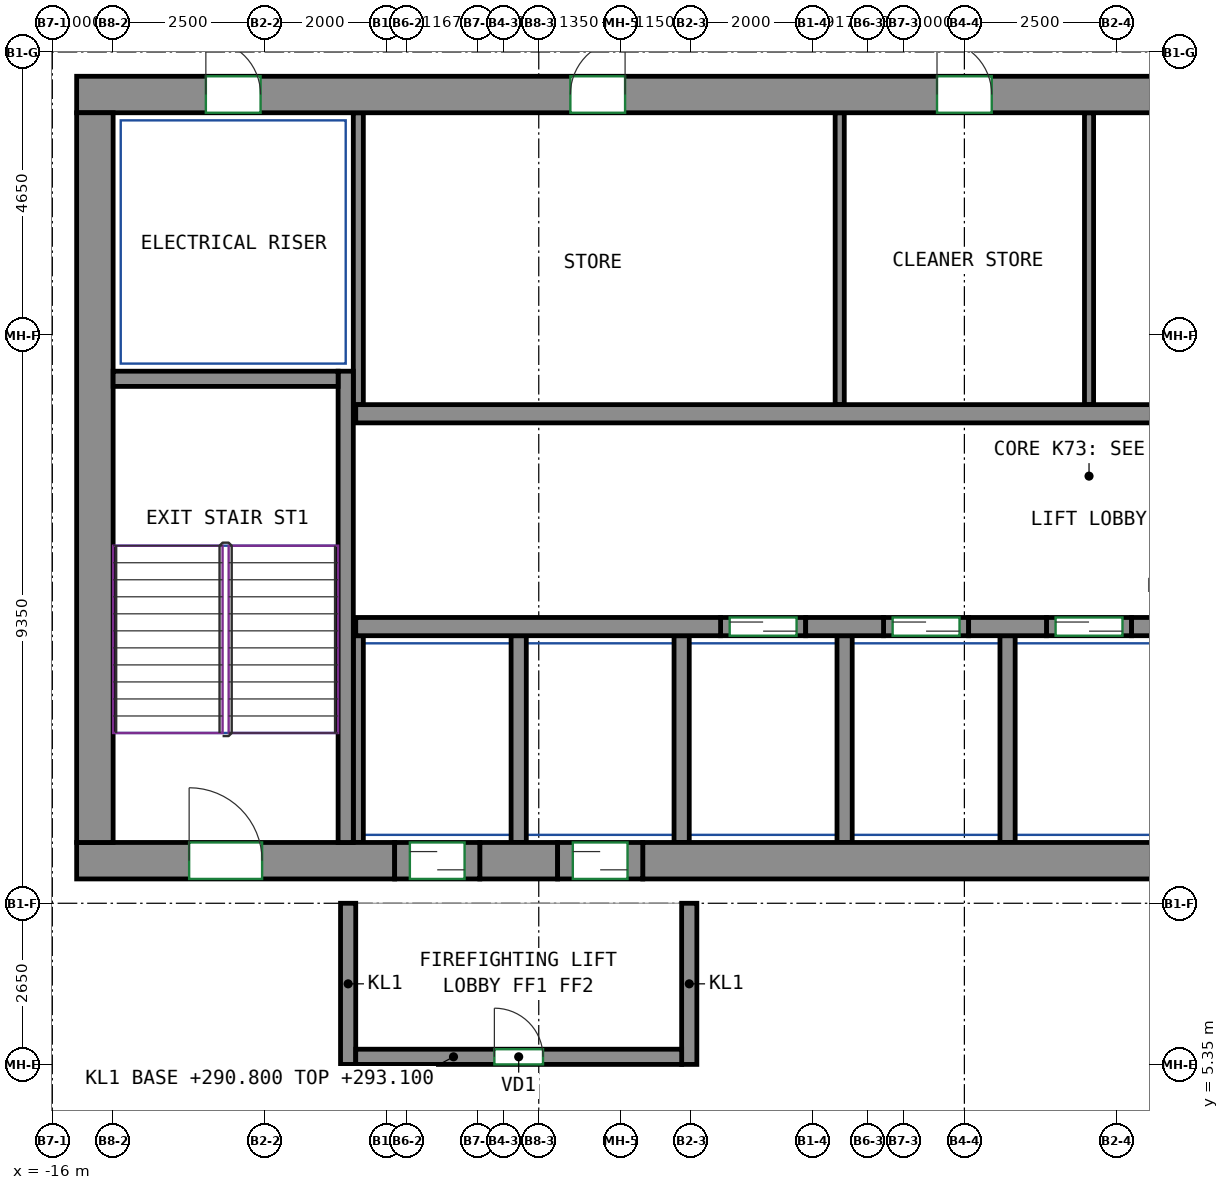
"""IFC4 building model, lengths in metres.
Left out: names, types, materials, properties, quantities, classifications, styles, units other than length and angle.
Written with IfcOpenShell. Run it as: python <this file> out.ifc"""

import sys

from ifc_helpers import new_model, si_unit, direction, frame, frame_2d, origin, place, context, subcontext, project, spatial, rectangle, extrude, source, transform, mapped, element, fill, save


model = new_model("IFC4")
c1 = context("Model", 3, precision=1e-05, world=origin(), true_north=direction((0.0, 1.0)))
c2 = subcontext(c1, "Body", "Model", "MODEL_VIEW")
j1 = project(units=[si_unit("LENGTHUNIT", "METRE"), si_unit("PLANEANGLEUNIT", "RADIAN")], contexts=[c1])
p1 = place(None, origin())
s1 = spatial("IfcSite", under=j1, at=p1, CompositionType="ELEMENT")
p2 = place(p1, origin())
s2 = spatial("IfcBuilding", under=s1, at=p2, CompositionType="ELEMENT")
p3 = place(p2, frame((0.0, 0.0, 290.8)))
s3 = spatial("IfcBuildingStorey", under=s2, at=p3, CompositionType="ELEMENT", Elevation=290.8)
m1 = source(origin(), c2, "Body", "SweptSolid", [
    extrude(rectangle(XDim=5.23, YDim=0.6, at=frame_2d((2.615, 0.0))), origin(), (0.0, 0.0, 1.0), 3.8),
])
p4 = place(p3, frame((-15.6, 8.7, 0.0), z_axis=(0.0, 0.0, 1.0), x_axis=(1.0, 0.0, 0.0)))
e1 = element("IfcWall", 1, at=p4, inside=s3, PredefinedType="SHEAR", context=c2, shape_type="MappedRepresentation", body=[
    mapped(m1, transform((0.0, 0.0, 0.0))),
])
p5 = place(p4, frame((1.85, 0.0, 0.0)))
e2 = element("IfcOpeningElement", 2, at=p5, cuts=e1, PredefinedType="OPENING", context=c2, shape_type="SweptSolid", body=[
    extrude(rectangle(XDim=1.2, YDim=2.1, at=frame_2d((0.6, 1.05))), frame((0.0, 0.31, 0.0), z_axis=(0.0, -1.0, 0.0), x_axis=(1.0, 0.0, 0.0)), (0.0, 0.0, 1.0), 0.62),
])
m2 = source(origin(), c2, "Body", "SweptSolid", [
    extrude(rectangle(XDim=1.28, YDim=0.6, at=frame_2d((0.64, 0.0))), origin(), (0.0, 0.0, 1.0), 3.8),
])
p6 = place(p3, frame((-8.97, 8.7, 0.0), z_axis=(0.0, 0.0, 1.0), x_axis=(1.0, 0.0, 0.0)))
e3 = element("IfcWall", 3, at=p6, inside=s3, PredefinedType="SHEAR", context=c2, shape_type="MappedRepresentation", body=[
    mapped(m2, transform((0.0, 0.0, 0.0))),
])
m3 = source(origin(), c2, "Body", "SweptSolid", [
    extrude(rectangle(XDim=14.18, YDim=0.6, at=frame_2d((7.09, 0.0))), origin(), (0.0, 0.0, 1.0), 3.8),
])
p7 = place(p3, frame((-6.29, 8.7, 0.0), z_axis=(0.0, 0.0, 1.0), x_axis=(1.0, 0.0, 0.0)))
e4 = element("IfcWall", 4, at=p7, inside=s3, PredefinedType="SHEAR", context=c2, shape_type="MappedRepresentation", body=[
    mapped(m3, transform((0.0, 0.0, 0.0))),
])
m4 = source(origin(), c2, "Body", "SweptSolid", [
    extrude(rectangle(XDim=33.3, YDim=0.6, at=frame_2d((16.65, 0.0))), origin(), (0.0, 0.0, 1.0), 3.8),
])
p8 = place(p3, frame((-15.6, 21.3, 0.0), z_axis=(0.0, 0.0, 1.0), x_axis=(1.0, 0.0, 0.0)))
e5 = element("IfcWall", 5, at=p8, inside=s3, PredefinedType="SHEAR", context=c2, shape_type="MappedRepresentation", body=[
    mapped(m4, transform((0.0, 0.0, 0.0))),
])
p9 = place(p8, frame((8.12, 0.0, 0.0)))
e6 = element("IfcOpeningElement", 6, at=p9, cuts=e5, PredefinedType="OPENING", context=c2, shape_type="SweptSolid", body=[
    extrude(rectangle(XDim=0.9, YDim=2.1, at=frame_2d((0.45, 1.05))), frame((0.0, 0.31, 0.0), z_axis=(0.0, -1.0, 0.0), x_axis=(1.0, 0.0, 0.0)), (0.0, 0.0, 1.0), 0.62),
])
p10 = place(p8, frame((14.15, 0.0, 0.0)))
e7 = element("IfcOpeningElement", 7, at=p10, cuts=e5, PredefinedType="OPENING", context=c2, shape_type="SweptSolid", body=[
    extrude(rectangle(XDim=0.9, YDim=2.1, at=frame_2d((0.45, 1.05))), frame((0.0, 0.31, 0.0), z_axis=(0.0, -1.0, 0.0), x_axis=(1.0, 0.0, 0.0)), (0.0, 0.0, 1.0), 0.62),
])
p11 = place(p8, frame((18.974, 0.0, 0.0)))
e8 = element("IfcOpeningElement", 8, at=p11, cuts=e5, PredefinedType="OPENING", context=c2, shape_type="SweptSolid", body=[
    extrude(rectangle(XDim=0.9, YDim=2.1, at=frame_2d((0.45, 1.05))), frame((0.0, 0.31, 0.0), z_axis=(0.0, -1.0, 0.0), x_axis=(1.0, 0.0, 0.0)), (0.0, 0.0, 1.0), 0.62),
])
p12 = place(p8, frame((23.664, 0.0, 0.0)))
e9 = element("IfcOpeningElement", 9, at=p12, cuts=e5, PredefinedType="OPENING", context=c2, shape_type="SweptSolid", body=[
    extrude(rectangle(XDim=0.9, YDim=2.1, at=frame_2d((0.45, 1.05))), frame((0.0, 0.31, 0.0), z_axis=(0.0, -1.0, 0.0), x_axis=(1.0, 0.0, 0.0)), (0.0, 0.0, 1.0), 0.62),
])
p13 = place(p8, frame((26.92, 0.0, 0.0)))
e10 = element("IfcOpeningElement", 10, at=p13, cuts=e5, PredefinedType="OPENING", context=c2, shape_type="SweptSolid", body=[
    extrude(rectangle(XDim=0.9, YDim=2.1, at=frame_2d((0.45, 1.05))), frame((0.0, 0.31, 0.0), z_axis=(0.0, -1.0, 0.0), x_axis=(1.0, 0.0, 0.0)), (0.0, 0.0, 1.0), 0.62),
])
p14 = place(p8, frame((2.125, 0.0, 0.0)))
e11 = element("IfcOpeningElement", 11, at=p14, cuts=e5, PredefinedType="OPENING", context=c2, shape_type="SweptSolid", body=[
    extrude(rectangle(XDim=0.9, YDim=2.1, at=frame_2d((0.45, 1.05))), frame((0.0, 0.31, 0.0), z_axis=(0.0, -1.0, 0.0), x_axis=(1.0, 0.0, 0.0)), (0.0, 0.0, 1.0), 0.62),
])
p15 = place(p8, frame((30.275, 0.0, 0.0)))
e12 = element("IfcOpeningElement", 12, at=p15, cuts=e5, PredefinedType="OPENING", context=c2, shape_type="SweptSolid", body=[
    extrude(rectangle(XDim=0.9, YDim=2.1, at=frame_2d((0.45, 1.05))), frame((0.0, 0.31, 0.0), z_axis=(0.0, -1.0, 0.0), x_axis=(1.0, 0.0, 0.0)), (0.0, 0.0, 1.0), 0.62),
])
m5 = source(origin(), c2, "Body", "SweptSolid", [
    extrude(rectangle(XDim=12.0, YDim=0.6, at=frame_2d((6.0, 0.0))), origin(), (0.0, 0.0, 1.0), 3.8),
])
p16 = place(p3, frame((-15.3, 9.0, 0.0), z_axis=(0.0, 0.0, 1.0), x_axis=(0.0, 1.0, 0.0)))
e13 = element("IfcWall", 13, at=p16, inside=s3, PredefinedType="SHEAR", context=c2, shape_type="MappedRepresentation", body=[
    mapped(m5, transform((0.0, 0.0, 0.0))),
])
m6 = source(origin(), c2, "Body", "SweptSolid", [
    extrude(rectangle(XDim=7.75, YDim=0.25, at=frame_2d((3.875, 0.0))), origin(), (0.0, 0.0, 1.0), 3.8),
])
p17 = place(p3, frame((-11.175, 9.0, 0.0), z_axis=(0.0, 0.0, 1.0), x_axis=(0.0, 1.0, 0.0)))
e14 = element("IfcWall", 14, at=p17, inside=s3, PredefinedType="SHEAR", context=c2, shape_type="MappedRepresentation", body=[
    mapped(m6, transform((0.0, 0.0, 0.0))),
])
m7 = source(origin(), c2, "Body", "SweptSolid", [
    extrude(rectangle(XDim=3.7, YDim=0.25, at=frame_2d((1.85, 0.0))), origin(), (0.0, 0.0, 1.0), 3.8),
])
p18 = place(p3, frame((-15.0, 16.625, 0.0), z_axis=(0.0, 0.0, 1.0), x_axis=(1.0, 0.0, 0.0)))
e15 = element("IfcWall", 15, at=p18, inside=s3, PredefinedType="SHEAR", context=c2, shape_type="MappedRepresentation", body=[
    mapped(m7, transform((0.0, 0.0, 0.0))),
])
m8 = source(origin(), c2, "Body", "SweptSolid", [
    extrude(rectangle(XDim=6.0, YDim=0.3, at=frame_2d((3.0, 0.0))), origin(), (0.0, 0.0, 1.0), 3.8),
])
p19 = place(p3, frame((-11.01, 12.55, 0.0), z_axis=(0.0, 0.0, 1.0), x_axis=(1.0, 0.0, 0.0)))
e16 = element("IfcWall", 16, at=p19, inside=s3, PredefinedType="SHEAR", context=c2, shape_type="MappedRepresentation", body=[
    mapped(m8, transform((0.0, 0.0, 0.0))),
])
m9 = source(origin(), c2, "Body", "SweptSolid", [
    extrude(rectangle(XDim=1.28, YDim=0.3, at=frame_2d((0.64, 0.0))), origin(), (0.0, 0.0, 1.0), 3.8),
])
for number, where, z_axis, x_axis in (
    (17, (-3.61, 12.55, 0.0), (0.0, 0.0, 1.0), (1.0, 0.0, 0.0)),
    (18, (-0.93, 12.55, 0.0), (0.0, 0.0, 1.0), (1.0, 0.0, 0.0)),
    (19, (1.75, 12.55, 0.0), (0.0, 0.0, 1.0), (1.0, 0.0, 0.0)),
):
    element("IfcWall", number, at=place(p3, frame(where, z_axis=z_axis, x_axis=x_axis)), inside=s3, PredefinedType="SHEAR", context=c2, shape_type="MappedRepresentation", body=[
        mapped(m9, transform((0.0, 0.0, 0.0))),
    ])
m10 = source(origin(), c2, "Body", "SweptSolid", [
    extrude(rectangle(XDim=22.08, YDim=0.3, at=frame_2d((11.04, 0.0))), origin(), (0.0, 0.0, 1.0), 3.8),
])
p20 = place(p3, frame((-11.01, 16.05, 0.0), z_axis=(0.0, 0.0, 1.0), x_axis=(1.0, 0.0, 0.0)))
e20 = element("IfcWall", 20, at=p20, inside=s3, PredefinedType="SHEAR", context=c2, shape_type="MappedRepresentation", body=[
    mapped(m10, transform((0.0, 0.0, 0.0))),
])
m11 = source(origin(), c2, "Body", "SweptSolid", [
    extrude(rectangle(XDim=1.4, YDim=0.3, at=frame_2d((0.7, 0.0))), origin(), (0.0, 0.0, 1.0), 3.8),
])
p21 = place(p3, frame((-5.01, 12.55, 0.0), z_axis=(0.0, 0.0, 1.0), x_axis=(1.0, 0.0, 0.0)))
e21 = element("IfcWall", 21, at=p21, inside=s3, PredefinedType="PARTITIONING", context=c2, shape_type="MappedRepresentation", body=[
    mapped(m11, transform((0.0, 0.0, 0.0))),
])
p22 = place(p21, frame((0.15, 0.0, 0.0)))
e22 = element("IfcOpeningElement", 22, at=p22, cuts=e21, PredefinedType="OPENING", context=c2, shape_type="SweptSolid", body=[
    extrude(rectangle(XDim=1.1, YDim=2.1, at=frame_2d((0.55, 1.05))), frame((0.0, 0.16, 0.0), z_axis=(0.0, -1.0, 0.0), x_axis=(1.0, 0.0, 0.0)), (0.0, 0.0, 1.0), 0.32),
])
m12 = source(origin(), c2, "Body", "SweptSolid", [
    extrude(rectangle(XDim=1.4, YDim=0.3, at=frame_2d((0.7, 0.0))), origin(), (0.0, 0.0, 1.0), 3.8),
])
p23 = place(p3, frame((-2.33, 12.55, 0.0), z_axis=(0.0, 0.0, 1.0), x_axis=(1.0, 0.0, 0.0)))
e23 = element("IfcWall", 23, at=p23, inside=s3, PredefinedType="PARTITIONING", context=c2, shape_type="MappedRepresentation", body=[
    mapped(m12, transform((0.0, 0.0, 0.0))),
])
p24 = place(p23, frame((0.15, 0.0, 0.0)))
e24 = element("IfcOpeningElement", 24, at=p24, cuts=e23, PredefinedType="OPENING", context=c2, shape_type="SweptSolid", body=[
    extrude(rectangle(XDim=1.1, YDim=2.1, at=frame_2d((0.55, 1.05))), frame((0.0, 0.16, 0.0), z_axis=(0.0, -1.0, 0.0), x_axis=(1.0, 0.0, 0.0)), (0.0, 0.0, 1.0), 0.32),
])
p25 = place(p3, frame((0.35, 12.55, 0.0), z_axis=(0.0, 0.0, 1.0), x_axis=(1.0, 0.0, 0.0)))
e25 = element("IfcWall", 25, at=p25, inside=s3, PredefinedType="PARTITIONING", context=c2, shape_type="MappedRepresentation", body=[
    mapped(m11, transform((0.0, 0.0, 0.0))),
])
p26 = place(p25, frame((0.15, 0.0, 0.0)))
e26 = element("IfcOpeningElement", 26, at=p26, cuts=e25, PredefinedType="OPENING", context=c2, shape_type="SweptSolid", body=[
    extrude(rectangle(XDim=1.1, YDim=2.1, at=frame_2d((0.55, 1.05))), frame((0.0, 0.16, 0.0), z_axis=(0.0, -1.0, 0.0), x_axis=(1.0, 0.0, 0.0)), (0.0, 0.0, 1.0), 0.32),
])
m13 = source(origin(), c2, "Body", "SweptSolid", [
    extrude(rectangle(XDim=2.65, YDim=0.25, at=frame_2d((1.325, 0.0))), origin(), (0.0, 0.0, 1.0), 3.25),
])
for number, where, z_axis, x_axis in (
    (27, (-11.135, 5.35, 0.0), (0.0, 0.0, 1.0), (0.0, 1.0, 0.0)),
    (28, (-5.525, 5.35, 0.0), (0.0, 0.0, 1.0), (0.0, 1.0, 0.0)),
):
    element("IfcWall", number, at=place(p3, frame(where, z_axis=z_axis, x_axis=x_axis)), inside=s3, PredefinedType="PARTITIONING", context=c2, shape_type="MappedRepresentation", body=[
        mapped(m13, transform((0.0, 0.0, 0.0))),
    ])
m14 = source(origin(), c2, "Body", "SweptSolid", [
    extrude(rectangle(XDim=5.36, YDim=0.25, at=frame_2d((2.68, 0.0))), origin(), (0.0, 0.0, 1.0), 2.3),
])
p27 = place(p3, frame((-11.01, 5.475, 0.0), z_axis=(0.0, 0.0, 1.0), x_axis=(1.0, 0.0, 0.0)))
e29 = element("IfcWall", 29, at=p27, inside=s3, PredefinedType="PARTITIONING", context=c2, shape_type="MappedRepresentation", body=[
    mapped(m14, transform((0.0, 0.0, 0.0))),
])
p28 = place(p27, frame((2.28, 0.0, 0.0)))
e30 = element("IfcOpeningElement", 30, at=p28, cuts=e29, PredefinedType="OPENING", context=c2, shape_type="SweptSolid", body=[
    extrude(rectangle(XDim=0.8, YDim=2.0, at=frame_2d((0.4, 1.0))), frame((0.0, 0.135, 0.0), z_axis=(0.0, -1.0, 0.0), x_axis=(1.0, 0.0, 0.0)), (0.0, 0.0, 1.0), 0.27),
])
m15 = source(origin(), c2, "Body", "SweptSolid", [
    extrude(rectangle(XDim=4.8, YDim=0.165, at=frame_2d((2.4, 0.0))), origin(), (0.0, 0.0, 1.0), 3.8),
])
p29 = place(p3, frame((-10.968, 16.2, 0.0), z_axis=(0.0, 0.0, 1.0), x_axis=(0.0, 1.0, 0.0)))
e31 = element("IfcWall", 31, at=p29, inside=s3, PredefinedType="PARTITIONING", context=c2, shape_type="MappedRepresentation", body=[
    mapped(m15, transform((0.0, 0.0, 0.0))),
])
m16 = source(origin(), c2, "Body", "SweptSolid", [
    extrude(rectangle(XDim=3.4, YDim=0.25, at=frame_2d((1.7, 0.0))), origin(), (0.0, 0.0, 1.0), 3.8),
])
p30 = place(p3, frame((-0.29, 9.0, 0.0), z_axis=(0.0, 0.0, 1.0), x_axis=(0.0, 1.0, 0.0)))
e32 = element("IfcWall", 32, at=p30, inside=s3, PredefinedType="PARTITIONING", context=c2, shape_type="MappedRepresentation", body=[
    mapped(m16, transform((0.0, 0.0, 0.0))),
])
m17 = source(origin(), c2, "Body", "SweptSolid", [
    extrude(rectangle(XDim=3.4, YDim=0.165, at=frame_2d((1.7, 0.0))), origin(), (0.0, 0.0, 1.0), 3.8),
])
p31 = place(p3, frame((-10.968, 9.0, 0.0), z_axis=(0.0, 0.0, 1.0), x_axis=(0.0, 1.0, 0.0)))
e33 = element("IfcWall", 33, at=p31, inside=s3, PredefinedType="PARTITIONING", context=c2, shape_type="MappedRepresentation", body=[
    mapped(m17, transform((0.0, 0.0, 0.0))),
])
for number, where, z_axis, x_axis in (
    (34, (-2.97, 9.0, 0.0), (0.0, 0.0, 1.0), (0.0, 1.0, 0.0)),
    (35, (-5.65, 9.0, 0.0), (0.0, 0.0, 1.0), (0.0, 1.0, 0.0)),
    (36, (-8.33, 9.0, 0.0), (0.0, 0.0, 1.0), (0.0, 1.0, 0.0)),
):
    element("IfcWall", number, at=place(p3, frame(where, z_axis=z_axis, x_axis=x_axis)), inside=s3, PredefinedType="PARTITIONING", context=c2, shape_type="MappedRepresentation", body=[
        mapped(m16, transform((0.0, 0.0, 0.0))),
    ])
m18 = source(origin(), c2, "Body", "SweptSolid", [
    extrude(rectangle(XDim=4.8, YDim=0.15, at=frame_2d((2.4, 0.0))), origin(), (0.0, 0.0, 1.0), 3.8),
])
for number, where, z_axis, x_axis in (
    (37, (-3.05, 16.2, 0.0), (0.0, 0.0, 1.0), (0.0, 1.0, 0.0)),
    (38, (1.05, 16.2, 0.0), (0.0, 0.0, 1.0), (0.0, 1.0, 0.0)),
):
    element("IfcWall", number, at=place(p3, frame(where, z_axis=z_axis, x_axis=x_axis)), inside=s3, PredefinedType="PARTITIONING", context=c2, shape_type="MappedRepresentation", body=[
        mapped(m18, transform((0.0, 0.0, 0.0))),
    ])
m19 = source(origin(), c2, "Body", "SweptSolid", [
    extrude(rectangle(XDim=1.4, YDim=0.6, at=frame_2d((0.7, 0.0))), origin(), (0.0, 0.0, 1.0), 2.7),
])
p32 = place(p3, frame((-10.37, 8.7, 0.0), z_axis=(0.0, 0.0, 1.0), x_axis=(1.0, 0.0, 0.0)))
e39 = element("IfcWall", 39, at=p32, inside=s3, PredefinedType="PARTITIONING", context=c2, shape_type="MappedRepresentation", body=[
    mapped(m19, transform((0.0, 0.0, 0.0))),
])
p33 = place(p32, frame((0.25, 0.0, 0.0)))
e40 = element("IfcOpeningElement", 40, at=p33, cuts=e39, PredefinedType="OPENING", context=c2, shape_type="SweptSolid", body=[
    extrude(rectangle(XDim=0.9, YDim=2.1, at=frame_2d((0.45, 1.05))), frame((0.0, 0.31, 0.0), z_axis=(0.0, -1.0, 0.0), x_axis=(1.0, 0.0, 0.0)), (0.0, 0.0, 1.0), 0.62),
])
m20 = source(origin(), c2, "Body", "SweptSolid", [
    extrude(rectangle(XDim=1.4, YDim=0.6, at=frame_2d((0.7, 0.0))), origin(), (0.0, 0.0, 1.0), 2.7),
])
p34 = place(p3, frame((-7.69, 8.7, 0.0), z_axis=(0.0, 0.0, 1.0), x_axis=(1.0, 0.0, 0.0)))
e41 = element("IfcWall", 41, at=p34, inside=s3, PredefinedType="PARTITIONING", context=c2, shape_type="MappedRepresentation", body=[
    mapped(m20, transform((0.0, 0.0, 0.0))),
])
p35 = place(p34, frame((0.25, 0.0, 0.0)))
e42 = element("IfcOpeningElement", 42, at=p35, cuts=e41, PredefinedType="OPENING", context=c2, shape_type="SweptSolid", body=[
    extrude(rectangle(XDim=0.9, YDim=2.1, at=frame_2d((0.45, 1.05))), frame((0.0, 0.31, 0.0), z_axis=(0.0, -1.0, 0.0), x_axis=(1.0, 0.0, 0.0)), (0.0, 0.0, 1.0), 0.62),
])
p36 = place(p28, origin())
e43 = element("IfcDoor", 43, at=p36, inside=s3, OperationType="SINGLE_SWING_LEFT", PredefinedType="DOOR", context=c2, shape_type="SweptSolid", body=[
    extrude(rectangle(XDim=0.8, YDim=2.0, at=frame_2d((0.4, 1.0))), frame((0.0, 0.025, 0.0), z_axis=(0.0, -1.0, 0.0), x_axis=(1.0, 0.0, 0.0)), (0.0, 0.0, 1.0), 0.05),
])
fill(e30, e43)
p37 = place(p33, origin())
e44 = element("IfcDoor", 44, at=p37, inside=s3, OperationType="SLIDING_TO_LEFT", PredefinedType="DOOR", context=c2, shape_type="SweptSolid", body=[
    extrude(rectangle(XDim=0.9, YDim=2.1, at=frame_2d((0.45, 1.05))), frame((0.0, 0.205, 0.0), z_axis=(0.0, -1.0, 0.0), x_axis=(1.0, 0.0, 0.0)), (0.0, 0.0, 1.0), 0.05),
])
fill(e40, e44)
p38 = place(p35, origin())
e45 = element("IfcDoor", 45, at=p38, inside=s3, OperationType="SLIDING_TO_RIGHT", PredefinedType="DOOR", context=c2, shape_type="SweptSolid", body=[
    extrude(rectangle(XDim=0.9, YDim=2.1, at=frame_2d((0.45, 1.05))), frame((0.0, 0.205, 0.0), z_axis=(0.0, -1.0, 0.0), x_axis=(1.0, 0.0, 0.0)), (0.0, 0.0, 1.0), 0.05),
])
fill(e42, e45)
p39 = place(p22, origin())
e46 = element("IfcDoor", 46, at=p39, inside=s3, OperationType="DOUBLE_DOOR_SLIDING", PredefinedType="DOOR", context=c2, shape_type="SweptSolid", body=[
    extrude(rectangle(XDim=1.1, YDim=2.1, at=frame_2d((0.55, 1.05))), frame((0.0, 0.025, 0.0), z_axis=(0.0, -1.0, 0.0), x_axis=(1.0, 0.0, 0.0)), (0.0, 0.0, 1.0), 0.05),
])
fill(e22, e46)
p40 = place(p24, origin())
e47 = element("IfcDoor", 47, at=p40, inside=s3, OperationType="DOUBLE_DOOR_SLIDING", PredefinedType="DOOR", context=c2, shape_type="SweptSolid", body=[
    extrude(rectangle(XDim=1.1, YDim=2.1, at=frame_2d((0.55, 1.05))), frame((0.0, 0.025, 0.0), z_axis=(0.0, -1.0, 0.0), x_axis=(1.0, 0.0, 0.0)), (0.0, 0.0, 1.0), 0.05),
])
fill(e24, e47)
p41 = place(p26, origin())
e48 = element("IfcDoor", 48, at=p41, inside=s3, OperationType="DOUBLE_DOOR_SLIDING", PredefinedType="DOOR", context=c2, shape_type="SweptSolid", body=[
    extrude(rectangle(XDim=1.1, YDim=2.1, at=frame_2d((0.55, 1.05))), frame((0.0, 0.025, 0.0), z_axis=(0.0, -1.0, 0.0), x_axis=(1.0, 0.0, 0.0)), (0.0, 0.0, 1.0), 0.05),
])
fill(e26, e48)
p42 = place(p9, origin())
e49 = element("IfcDoor", 49, at=p42, inside=s3, OperationType="SINGLE_SWING_RIGHT", PredefinedType="DOOR", context=c2, shape_type="SweptSolid", body=[
    extrude(rectangle(XDim=0.9, YDim=2.1, at=frame_2d((0.45, 1.05))), frame((0.0, -0.155, 0.0), z_axis=(0.0, -1.0, 0.0), x_axis=(1.0, 0.0, 0.0)), (0.0, 0.0, 1.0), 0.05),
])
fill(e6, e49)
p43 = place(p10, origin())
e50 = element("IfcDoor", 50, at=p43, inside=s3, OperationType="SINGLE_SWING_LEFT", PredefinedType="DOOR", context=c2, shape_type="SweptSolid", body=[
    extrude(rectangle(XDim=0.9, YDim=2.1, at=frame_2d((0.45, 1.05))), frame((0.0, -0.155, 0.0), z_axis=(0.0, -1.0, 0.0), x_axis=(1.0, 0.0, 0.0)), (0.0, 0.0, 1.0), 0.05),
])
fill(e7, e50)
p44 = place(p14, origin())
e51 = element("IfcDoor", 51, at=p44, inside=s3, OperationType="SINGLE_SWING_LEFT", PredefinedType="DOOR", context=c2, shape_type="SweptSolid", body=[
    extrude(rectangle(XDim=0.9, YDim=2.1, at=frame_2d((0.45, 1.05))), frame((0.0, -0.155, 0.0), z_axis=(0.0, -1.0, 0.0), x_axis=(1.0, 0.0, 0.0)), (0.0, 0.0, 1.0), 0.05),
])
fill(e11, e51)
p45 = place(p5, origin())
e52 = element("IfcDoor", 52, at=p45, inside=s3, OperationType="DOUBLE_DOOR_SINGLE_SWING", PredefinedType="DOOR", context=c2, shape_type="SweptSolid", body=[
    extrude(rectangle(XDim=1.2, YDim=2.1, at=frame_2d((0.6, 1.05))), frame((0.0, 0.205, 0.0), z_axis=(0.0, -1.0, 0.0), x_axis=(1.0, 0.0, 0.0)), (0.0, 0.0, 1.0), 0.05),
])
fill(e2, e52)
save(model, sys.argv[1])
